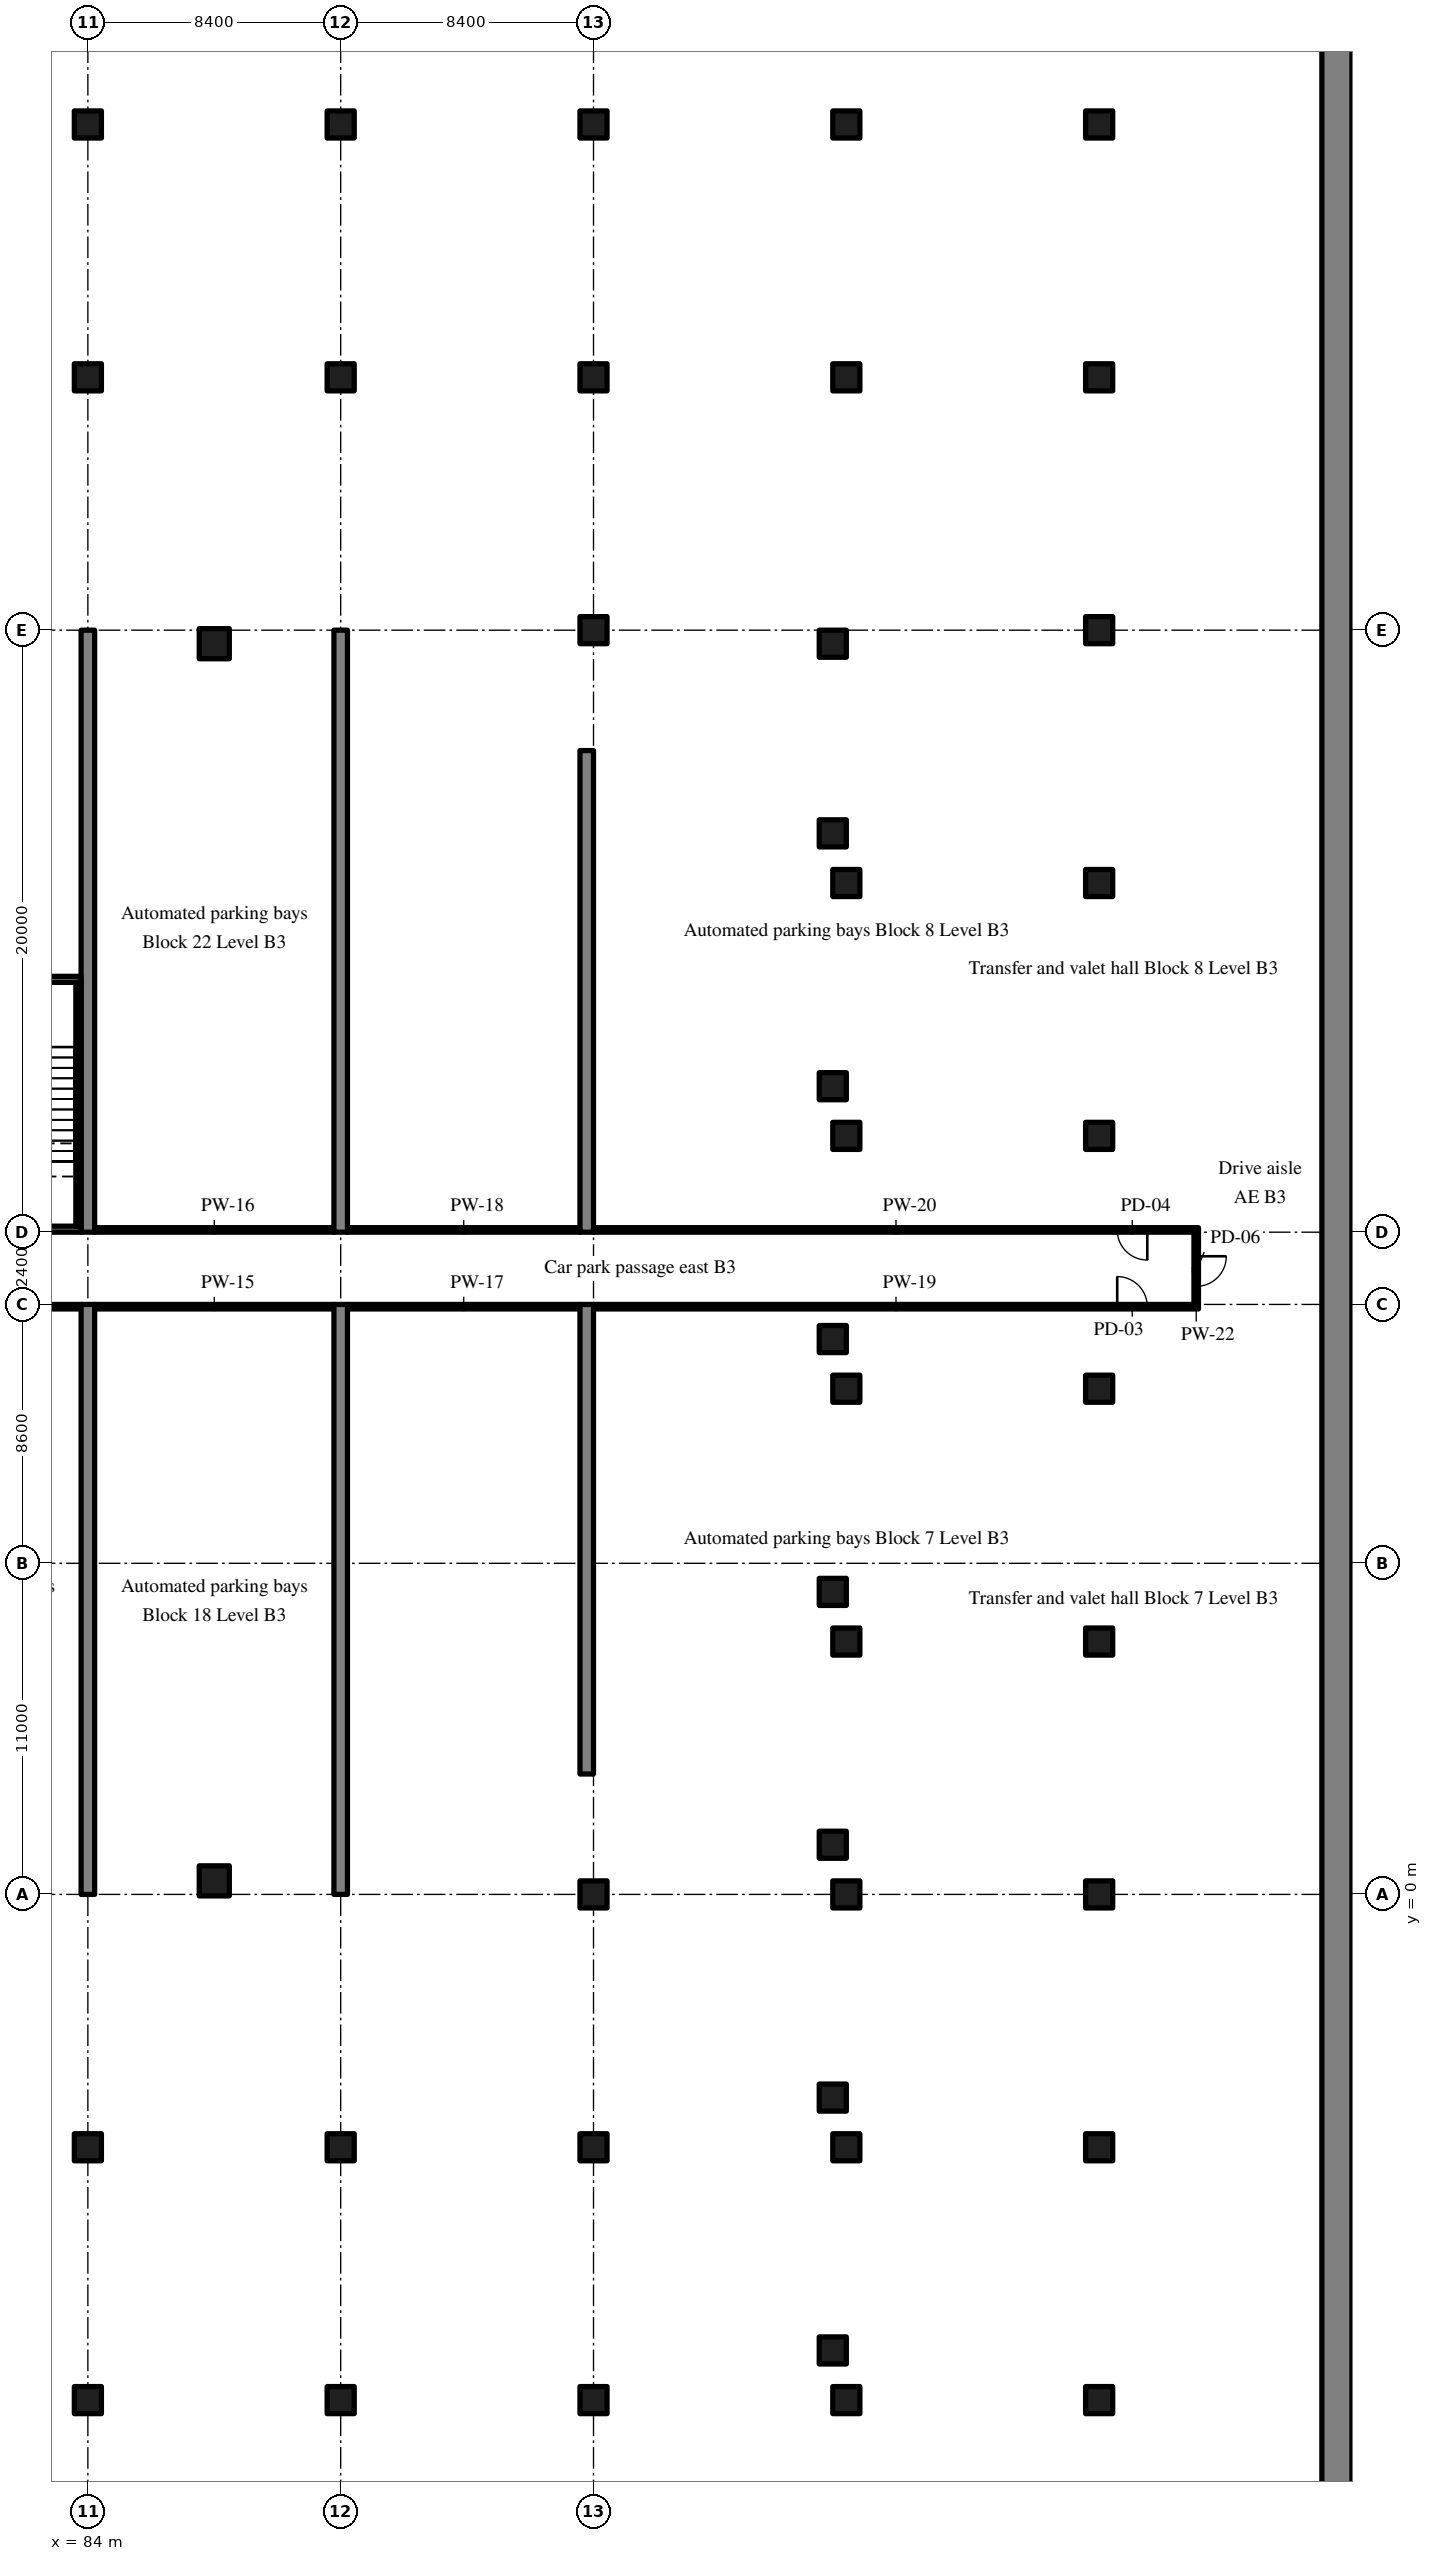
"""IFC4 building model, lengths in metres.
Left out: names, types, materials, properties, quantities, classifications, styles, units other than length and angle.
Written with IfcOpenShell. Run it as: python <this file> out.ifc"""

import sys

from ifc_helpers import new_model, si_unit, direction, frame, frame_2d, origin, origin_2d, place, context, subcontext, project, spatial, rectangle, extrude, source, transform, mapped, element, fill, save


model = new_model("IFC4")
c1 = context("Model", 3, precision=1e-05, world=origin(), true_north=direction((0.0, 1.0)))
c2 = subcontext(c1, "Body", "Model", "MODEL_VIEW")
j1 = project(units=[si_unit("LENGTHUNIT", "METRE"), si_unit("PLANEANGLEUNIT", "RADIAN")], contexts=[c1])
p1 = place(None, origin())
s1 = spatial("IfcSite", under=j1, at=p1, CompositionType="ELEMENT")
p2 = place(p1, origin())
s2 = spatial("IfcBuilding", under=s1, at=p2, CompositionType="ELEMENT")
p3 = place(p2, frame((0.0, 0.0, -13.5)))
s3 = spatial("IfcBuildingStorey", under=s2, at=p3, CompositionType="ELEMENT", Elevation=-13.5)
m1 = source(origin(), c2, "Body", "SweptSolid", [
    extrude(rectangle(XDim=98.8, YDim=1.0, at=frame_2d((49.4, 0.0))), origin(), (0.0, 0.0, 1.0), 4.52),
])
p4 = place(p3, frame((125.5, -32.6, -0.3), z_axis=(0.0, 0.0, 1.0), x_axis=(0.0, 1.0, 0.0)))
e1 = element("IfcWall", 1, at=p4, inside=s3, PredefinedType="SHEAR", context=c2, shape_type="MappedRepresentation", body=[
    mapped(m1, transform((0.0, 0.0, 0.0), scale=1.0)),
])
m2 = source(origin(), c2, "Body", "SweptSolid", [
    extrude(rectangle(XDim=19.6, YDim=0.45, at=frame_2d((9.8, 0.0))), origin(), (0.0, 0.0, 1.0), 4.52),
])
p5 = place(p3, frame((84.0, 0.0, -0.3), z_axis=(0.0, 0.0, 1.0), x_axis=(0.0, 1.0, 0.0)))
e2 = element("IfcWall", 2, at=p5, inside=s3, PredefinedType="SHEAR", context=c2, shape_type="MappedRepresentation", body=[
    mapped(m2, transform((0.0, 0.0, 0.0), scale=1.0)),
])
m3 = source(origin(), c2, "Body", "SweptSolid", [
    extrude(rectangle(XDim=20.0, YDim=0.45, at=frame_2d((10.0, 0.0))), origin(), (0.0, 0.0, 1.0), 4.52),
])
p6 = place(p3, frame((84.0, 22.0, -0.3), z_axis=(0.0, 0.0, 1.0), x_axis=(0.0, 1.0, 0.0)))
e3 = element("IfcWall", 3, at=p6, inside=s3, PredefinedType="SHEAR", context=c2, shape_type="MappedRepresentation", body=[
    mapped(m3, transform((0.0, 0.0, 0.0), scale=1.0)),
])
p7 = place(p3, frame((92.4, 0.0, -0.3), z_axis=(0.0, 0.0, 1.0), x_axis=(0.0, 1.0, 0.0)))
e4 = element("IfcWall", 4, at=p7, inside=s3, PredefinedType="SHEAR", context=c2, shape_type="MappedRepresentation", body=[
    mapped(m2, transform((0.0, 0.0, 0.0), scale=1.0)),
])
p8 = place(p3, frame((92.4, 22.0, -0.3), z_axis=(0.0, 0.0, 1.0), x_axis=(0.0, 1.0, 0.0)))
e5 = element("IfcWall", 5, at=p8, inside=s3, PredefinedType="SHEAR", context=c2, shape_type="MappedRepresentation", body=[
    mapped(m3, transform((0.0, 0.0, 0.0), scale=1.0)),
])
m4 = source(origin(), c2, "Body", "SweptSolid", [
    extrude(rectangle(XDim=15.6, YDim=0.45, at=frame_2d((7.8, 0.0))), origin(), (0.0, 0.0, 1.0), 4.52),
])
p9 = place(p3, frame((100.575, 4.0, -0.3), z_axis=(0.0, 0.0, 1.0), x_axis=(0.0, 1.0, 0.0)))
e6 = element("IfcWall", 6, at=p9, inside=s3, PredefinedType="SHEAR", context=c2, shape_type="MappedRepresentation", body=[
    mapped(m4, transform((0.0, 0.0, 0.0), scale=1.0)),
])
m5 = source(origin(), c2, "Body", "SweptSolid", [
    extrude(rectangle(XDim=16.0, YDim=0.45, at=frame_2d((8.0, 0.0))), origin(), (0.0, 0.0, 1.0), 4.52),
])
p10 = place(p3, frame((100.575, 22.0, -0.3), z_axis=(0.0, 0.0, 1.0), x_axis=(0.0, 1.0, 0.0)))
e7 = element("IfcWall", 7, at=p10, inside=s3, PredefinedType="SHEAR", context=c2, shape_type="MappedRepresentation", body=[
    mapped(m5, transform((0.0, 0.0, 0.0), scale=1.0)),
])
m6 = source(origin(), c2, "Body", "SweptSolid", [
    extrude(rectangle(XDim=1.0, YDim=1.0, at=origin_2d()), origin(), (0.0, 0.0, 1.0), 4.52),
])
for number, where, z_axis, x_axis in (
    (8, (88.2, 0.45, -0.3), (0.0, 0.0, 1.0), (1.0, 0.0, 0.0)),
    (9, (88.2, 41.55, -0.3), (0.0, 0.0, 1.0), (1.0, 0.0, 0.0)),
):
    element("IfcColumn", number, at=place(p3, frame(where, z_axis=z_axis, x_axis=x_axis)), inside=s3, PredefinedType="COLUMN", context=c2, shape_type="MappedRepresentation", body=[
        mapped(m6, transform((0.0, 0.0, 0.0), scale=1.0)),
    ])
m7 = source(origin(), c2, "Body", "SweptSolid", [
    extrude(rectangle(XDim=0.9, YDim=0.9, at=origin_2d()), origin(), (0.0, 0.0, 1.0), 4.52),
])
for number, where, z_axis, x_axis in (
    (10, (108.75, -15.15, -0.3), (0.0, 0.0, 1.0), (1.0, 0.0, 0.0)),
    (11, (108.75, -6.75, -0.3), (0.0, 0.0, 1.0), (1.0, 0.0, 0.0)),
    (12, (108.75, 1.65, -0.3), (0.0, 0.0, 1.0), (1.0, 0.0, 0.0)),
    (13, (108.75, 10.05, -0.3), (0.0, 0.0, 1.0), (1.0, 0.0, 0.0)),
    (14, (108.75, 18.45, -0.3), (0.0, 0.0, 1.0), (1.0, 0.0, 0.0)),
    (15, (108.75, 26.85, -0.3), (0.0, 0.0, 1.0), (1.0, 0.0, 0.0)),
    (16, (108.75, 35.25, -0.3), (0.0, 0.0, 1.0), (1.0, 0.0, 0.0)),
    (17, (108.75, 41.55, -0.3), (0.0, 0.0, 1.0), (1.0, 0.0, 0.0)),
    (18, (84.0, -16.8, -0.3), (0.0, 0.0, 1.0), (1.0, 0.0, 0.0)),
    (19, (84.0, -8.4, -0.3), (0.0, 0.0, 1.0), (1.0, 0.0, 0.0)),
    (20, (84.0, 50.4, -0.3), (0.0, 0.0, 1.0), (1.0, 0.0, 0.0)),
    (21, (84.0, 58.8, -0.3), (0.0, 0.0, 1.0), (1.0, 0.0, 0.0)),
    (22, (92.4, -16.8, -0.3), (0.0, 0.0, 1.0), (1.0, 0.0, 0.0)),
    (23, (92.4, -8.4, -0.3), (0.0, 0.0, 1.0), (1.0, 0.0, 0.0)),
    (24, (92.4, 50.4, -0.3), (0.0, 0.0, 1.0), (1.0, 0.0, 0.0)),
    (25, (92.4, 58.8, -0.3), (0.0, 0.0, 1.0), (1.0, 0.0, 0.0)),
    (26, (100.8, -16.8, -0.3), (0.0, 0.0, 1.0), (1.0, 0.0, 0.0)),
    (27, (100.8, -8.4, -0.3), (0.0, 0.0, 1.0), (1.0, 0.0, 0.0)),
    (28, (100.8, 0.0, -0.3), (0.0, 0.0, 1.0), (1.0, 0.0, 0.0)),
    (29, (100.8, 42.0, -0.3), (0.0, 0.0, 1.0), (1.0, 0.0, 0.0)),
    (30, (100.8, 50.4, -0.3), (0.0, 0.0, 1.0), (1.0, 0.0, 0.0)),
    (31, (100.8, 58.8, -0.3), (0.0, 0.0, 1.0), (1.0, 0.0, 0.0)),
    (32, (109.2, -16.8, -0.3), (0.0, 0.0, 1.0), (1.0, 0.0, 0.0)),
    (33, (109.2, -8.4, -0.3), (0.0, 0.0, 1.0), (1.0, 0.0, 0.0)),
    (34, (109.2, 0.0, -0.3), (0.0, 0.0, 1.0), (1.0, 0.0, 0.0)),
    (35, (109.2, 8.4, -0.3), (0.0, 0.0, 1.0), (1.0, 0.0, 0.0)),
    (36, (109.2, 16.8, -0.3), (0.0, 0.0, 1.0), (1.0, 0.0, 0.0)),
    (37, (109.2, 25.2, -0.3), (0.0, 0.0, 1.0), (1.0, 0.0, 0.0)),
    (38, (109.2, 33.6, -0.3), (0.0, 0.0, 1.0), (1.0, 0.0, 0.0)),
    (39, (109.2, 50.4, -0.3), (0.0, 0.0, 1.0), (1.0, 0.0, 0.0)),
    (40, (109.2, 58.8, -0.3), (0.0, 0.0, 1.0), (1.0, 0.0, 0.0)),
    (41, (117.6, -16.8, -0.3), (0.0, 0.0, 1.0), (1.0, 0.0, 0.0)),
    (42, (117.6, -8.4, -0.3), (0.0, 0.0, 1.0), (1.0, 0.0, 0.0)),
    (43, (117.6, 0.0, -0.3), (0.0, 0.0, 1.0), (1.0, 0.0, 0.0)),
    (44, (117.6, 8.4, -0.3), (0.0, 0.0, 1.0), (1.0, 0.0, 0.0)),
    (45, (117.6, 16.8, -0.3), (0.0, 0.0, 1.0), (1.0, 0.0, 0.0)),
    (46, (117.6, 25.2, -0.3), (0.0, 0.0, 1.0), (1.0, 0.0, 0.0)),
    (47, (117.6, 33.6, -0.3), (0.0, 0.0, 1.0), (1.0, 0.0, 0.0)),
    (48, (117.6, 42.0, -0.3), (0.0, 0.0, 1.0), (1.0, 0.0, 0.0)),
    (49, (117.6, 50.4, -0.3), (0.0, 0.0, 1.0), (1.0, 0.0, 0.0)),
    (50, (117.6, 58.8, -0.3), (0.0, 0.0, 1.0), (1.0, 0.0, 0.0)),
):
    element("IfcColumn", number, at=place(p3, frame(where, z_axis=z_axis, x_axis=x_axis)), inside=s3, PredefinedType="COLUMN", context=c2, shape_type="MappedRepresentation", body=[
        mapped(m7, transform((0.0, 0.0, 0.0), scale=1.0)),
    ])
m8 = source(origin(), c2, "Body", "SweptSolid", [
    extrude(rectangle(XDim=8.175, YDim=0.2, at=frame_2d((4.087, 0.0))), origin(), (0.0, 0.0, 1.0), 4.52),
])
p11 = place(p3, frame((83.775, 22.1, -0.3), z_axis=(0.0, 0.0, 1.0), x_axis=(-1.0, 0.0, 0.0)))
e51 = element("IfcWall", 51, at=p11, inside=s3, PredefinedType="SOLIDWALL", context=c2, shape_type="MappedRepresentation", body=[
    mapped(m8, transform((0.0, 0.0, 0.0), scale=1.0)),
])
m9 = source(origin(), c2, "Body", "SweptSolid", [
    extrude(rectangle(XDim=1.2, YDim=2.1, at=frame_2d((0.6, 1.05))), frame((0.0, 0.11, 0.0), z_axis=(0.0, -1.0, 0.0), x_axis=(1.0, 0.0, 0.0)), (0.0, 0.0, 1.0), 0.22),
])
p12 = place(p11, frame((5.975, 0.0, 0.0)))
e52 = element("IfcOpeningElement", 52, at=p12, cuts=e51, PredefinedType="OPENING", context=c2, shape_type="MappedRepresentation", body=[
    mapped(m9, transform((0.0, 0.0, 0.0), scale=1.0)),
])
p13 = place(p3, frame((83.775, 30.4, -0.3), z_axis=(0.0, 0.0, 1.0), x_axis=(-1.0, 0.0, 0.0)))
e53 = element("IfcWall", 53, at=p13, inside=s3, PredefinedType="SOLIDWALL", context=c2, shape_type="MappedRepresentation", body=[
    mapped(m8, transform((0.0, 0.0, 0.0), scale=1.0)),
])
m10 = source(origin(), c2, "Body", "SweptSolid", [
    extrude(rectangle(XDim=1.0, YDim=2.1, at=frame_2d((0.5, 1.05))), frame((0.0, 0.11, 0.0), z_axis=(0.0, -1.0, 0.0), x_axis=(1.0, 0.0, 0.0)), (0.0, 0.0, 1.0), 0.22),
])
p14 = place(p13, frame((6.075, 0.0, 0.0)))
e54 = element("IfcOpeningElement", 54, at=p14, cuts=e53, PredefinedType="OPENING", context=c2, shape_type="MappedRepresentation", body=[
    mapped(m10, transform((0.0, 0.0, 0.0), scale=1.0)),
])
m11 = source(origin(), c2, "Body", "SweptSolid", [
    extrude(rectangle(XDim=8.1, YDim=0.175, at=frame_2d((4.05, 0.0))), origin(), (0.0, 0.0, 1.0), 4.52),
])
p15 = place(p3, frame((83.688, 22.2, -0.3), z_axis=(0.0, 0.0, 1.0), x_axis=(0.0, 1.0, 0.0)))
e55 = element("IfcWall", 55, at=p15, inside=s3, PredefinedType="SOLIDWALL", context=c2, shape_type="MappedRepresentation", body=[
    mapped(m11, transform((0.0, 0.0, 0.0), scale=1.0)),
])
m12 = source(origin(), c2, "Body", "SweptSolid", [
    extrude(rectangle(XDim=7.95, YDim=0.15, at=frame_2d((3.975, 0.0))), origin(), (0.0, 0.0, 1.0), 4.22),
])
for number, where, z_axis, x_axis in (
    (56, (75.825, 19.525, 0.0), (0.0, 0.0, 1.0), (1.0, 0.0, 0.0)),
    (57, (84.225, 19.525, 0.0), (0.0, 0.0, 1.0), (1.0, 0.0, 0.0)),
    (58, (84.225, 22.075, 0.0), (0.0, 0.0, 1.0), (1.0, 0.0, 0.0)),
):
    element("IfcWall", number, at=place(p3, frame(where, z_axis=z_axis, x_axis=x_axis)), inside=s3, PredefinedType="PARTITIONING", context=c2, shape_type="MappedRepresentation", body=[
        mapped(m12, transform((0.0, 0.0, 0.0), scale=1.0)),
    ])
m13 = source(origin(), c2, "Body", "SweptSolid", [
    extrude(rectangle(XDim=7.725, YDim=0.15, at=frame_2d((3.863, 0.0))), origin(), (0.0, 0.0, 1.0), 4.22),
])
for number, where, z_axis, x_axis in (
    (59, (92.625, 19.525, 0.0), (0.0, 0.0, 1.0), (1.0, 0.0, 0.0)),
    (60, (92.625, 22.075, 0.0), (0.0, 0.0, 1.0), (1.0, 0.0, 0.0)),
):
    element("IfcWall", number, at=place(p3, frame(where, z_axis=z_axis, x_axis=x_axis)), inside=s3, PredefinedType="PARTITIONING", context=c2, shape_type="MappedRepresentation", body=[
        mapped(m13, transform((0.0, 0.0, 0.0), scale=1.0)),
    ])
m14 = source(origin(), c2, "Body", "SweptSolid", [
    extrude(rectangle(XDim=20.1, YDim=0.15, at=frame_2d((10.05, 0.0))), origin(), (0.0, 0.0, 1.0), 4.22),
])
p16 = place(p3, frame((100.8, 19.525, 0.0), z_axis=(0.0, 0.0, 1.0), x_axis=(1.0, 0.0, 0.0)))
e61 = element("IfcWall", 61, at=p16, inside=s3, PredefinedType="PARTITIONING", context=c2, shape_type="MappedRepresentation", body=[
    mapped(m14, transform((0.0, 0.0, 0.0), scale=1.0)),
])
m15 = source(origin(), c2, "Body", "SweptSolid", [
    extrude(rectangle(XDim=1.0, YDim=2.1, at=frame_2d((0.5, 1.05))), frame((0.0, 0.085, 0.0), z_axis=(0.0, -1.0, 0.0), x_axis=(1.0, 0.0, 0.0)), (0.0, 0.0, 1.0), 0.17),
])
p17 = place(p16, frame((17.4, 0.0, 0.0)))
e62 = element("IfcOpeningElement", 62, at=p17, cuts=e61, PredefinedType="OPENING", context=c2, shape_type="MappedRepresentation", body=[
    mapped(m15, transform((0.0, 0.0, 0.0), scale=1.0)),
])
p18 = place(p3, frame((100.8, 22.075, 0.0), z_axis=(0.0, 0.0, 1.0), x_axis=(1.0, 0.0, 0.0)))
e63 = element("IfcWall", 63, at=p18, inside=s3, PredefinedType="PARTITIONING", context=c2, shape_type="MappedRepresentation", body=[
    mapped(m14, transform((0.0, 0.0, 0.0), scale=1.0)),
])
p19 = place(p18, frame((17.4, 0.0, 0.0)))
e64 = element("IfcOpeningElement", 64, at=p19, cuts=e63, PredefinedType="OPENING", context=c2, shape_type="MappedRepresentation", body=[
    mapped(m15, transform((0.0, 0.0, 0.0), scale=1.0)),
])
m16 = source(origin(), c2, "Body", "SweptSolid", [
    extrude(rectangle(XDim=2.4, YDim=0.15, at=frame_2d((1.2, 0.0))), origin(), (0.0, 0.0, 1.0), 4.22),
])
p20 = place(p3, frame((120.825, 19.6, 0.0), z_axis=(0.0, 0.0, 1.0), x_axis=(0.0, 1.0, 0.0)))
e65 = element("IfcWall", 65, at=p20, inside=s3, PredefinedType="PARTITIONING", context=c2, shape_type="MappedRepresentation", body=[
    mapped(m16, transform((0.0, 0.0, 0.0), scale=1.0)),
])
p21 = place(p20, frame((0.6, 0.0, 0.0)))
e66 = element("IfcOpeningElement", 66, at=p21, cuts=e65, PredefinedType="OPENING", context=c2, shape_type="MappedRepresentation", body=[
    mapped(m15, transform((0.0, 0.0, 0.0), scale=1.0)),
])
m17 = source(origin(), c2, "Body", "SweptSolid", [
    extrude(rectangle(XDim=1.0, YDim=2.1, at=frame_2d((0.5, 1.05))), frame((0.0, 0.025, 0.0), z_axis=(0.0, -1.0, 0.0), x_axis=(1.0, 0.0, 0.0)), (0.0, 0.0, 1.0), 0.05),
])
p22 = place(p17, origin())
e67 = element("IfcDoor", 67, at=p22, inside=s3, OperationType="SINGLE_SWING_LEFT", PredefinedType="DOOR", context=c2, shape_type="MappedRepresentation", body=[
    mapped(m17, transform((0.0, 0.0, 0.0), scale=1.0)),
])
fill(e62, e67)
p23 = place(p19, origin())
e68 = element("IfcDoor", 68, at=p23, inside=s3, OperationType="SINGLE_SWING_RIGHT", PredefinedType="DOOR", context=c2, shape_type="MappedRepresentation", body=[
    mapped(m17, transform((0.0, 0.0, 0.0), scale=1.0)),
])
fill(e64, e68)
p24 = place(p21, origin())
e69 = element("IfcDoor", 69, at=p24, inside=s3, OperationType="SINGLE_SWING_RIGHT", PredefinedType="DOOR", context=c2, shape_type="MappedRepresentation", body=[
    mapped(m17, transform((0.0, 0.0, 0.0), scale=1.0)),
])
fill(e66, e69)
save(model, sys.argv[1])
